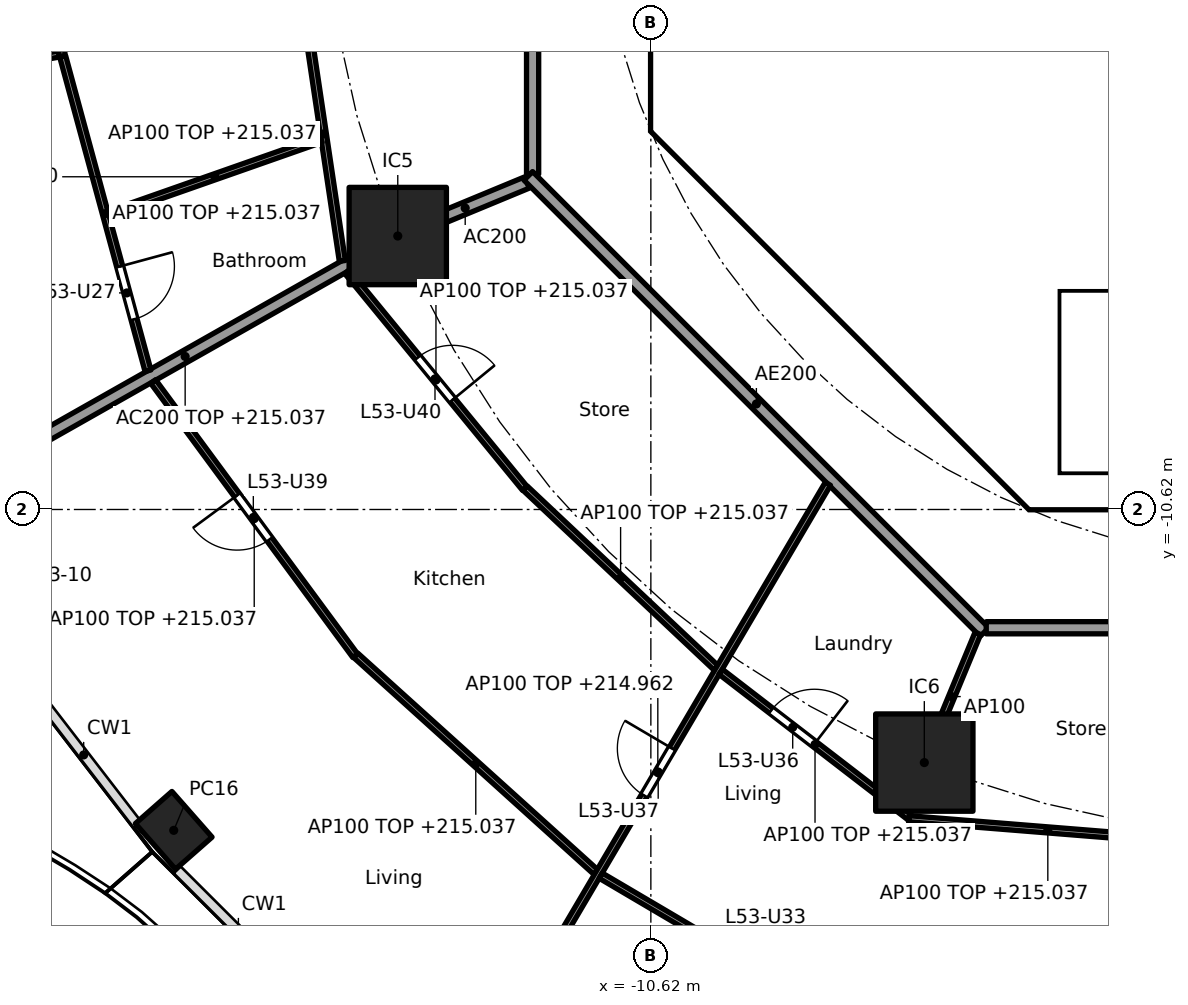
"""IFC4 building model, lengths in metres.
Left out: names, types, materials, properties, quantities, classifications, styles, units other than length and angle.
Written with IfcOpenShell. Run it as: python <this file> out.ifc"""

import sys

from ifc_helpers import new_model, si_unit, direction, frame, frame_2d, origin, origin_2d, place, context, subcontext, project, spatial, polyline, rectangle, hollow_rectangle, outline, extrude, element, fill, save


model = new_model("IFC4")
c1 = context("Model", 3, precision=1e-05, world=origin(), true_north=direction((0.0, 1.0)))
c2 = subcontext(c1, "Body", "Model", "MODEL_VIEW")
j1 = project(units=[si_unit("LENGTHUNIT", "METRE"), si_unit("PLANEANGLEUNIT", "RADIAN")], contexts=[c1])
p1 = place(None, origin())
s1 = spatial("IfcSite", under=j1, at=p1, CompositionType="ELEMENT")
p2 = place(p1, origin())
s2 = spatial("IfcBuilding", under=s1, at=p2, CompositionType="ELEMENT")
p3 = place(p2, frame((0.0, 0.0, 212.2)))
s3 = spatial("IfcBuildingStorey", under=s2, at=p3, CompositionType="ELEMENT", Elevation=212.2)
p4 = place(p3, frame((-18.467, -15.896, -0.26), z_axis=(0.0, 0.0, 1.0), x_axis=(0.660114607735, -0.751164898445, 0.0)))
e1 = element("IfcColumn", 1, at=p4, inside=s3, PredefinedType="COLUMN", context=c2, shape_type="SweptSolid", body=[
    extrude(hollow_rectangle(XDim=1.0, YDim=0.8, WallThickness=0.032, at=origin_2d()), origin(), (0.0, 0.0, 1.0), 3.96),
])
for number, where, z_axis, x_axis in (
    (2, (-14.782, -6.123, 0.0), (0.0, 0.0, 1.0), (1.0, 0.0, 0.0)),
    (3, (-6.123, -14.782, 0.0), (0.0, 0.0, 1.0), (1.0, 0.0, 0.0)),
):
    element("IfcColumn", number, at=place(p3, frame(where, z_axis=z_axis, x_axis=x_axis)), inside=s3, PredefinedType="COLUMN", context=c2, shape_type="SweptSolid", body=[
        extrude(rectangle(XDim=1.6, YDim=1.6, at=origin_2d()), origin(), (0.0, 0.0, 1.0), 3.7),
    ])
p5 = place(p3, frame((-10.325, 3.801, 0.0), z_axis=(0.0, 0.0, 1.0), x_axis=(0.0, -1.0, 0.0)))
e4 = element("IfcWall", 4, at=p5, inside=s3, PredefinedType="SHEAR", context=c2, shape_type="SweptSolid", body=[
    extrude(rectangle(XDim=7.602, YDim=0.6, at=frame_2d((3.801, 0.0))), origin(), (0.0, 0.0, 1.0), 3.44),
])
p6 = place(p5, frame((0.651, 0.0, 0.0)))
e5 = element("IfcOpeningElement", 5, at=p6, cuts=e4, PredefinedType="OPENING", context=c2, shape_type="SweptSolid", body=[
    extrude(rectangle(XDim=1.5, YDim=2.1, at=frame_2d((0.75, 1.05))), frame((0.0, 0.31, 0.0), z_axis=(0.0, -1.0, 0.0), x_axis=(1.0, 0.0, 0.0)), (0.0, 0.0, 1.0), 0.62),
])
p7 = place(p5, frame((5.451, 0.0, 0.0)))
e6 = element("IfcOpeningElement", 6, at=p7, cuts=e4, PredefinedType="OPENING", context=c2, shape_type="SweptSolid", body=[
    extrude(rectangle(XDim=1.5, YDim=2.1, at=frame_2d((0.75, 1.05))), frame((0.0, 0.31, 0.0), z_axis=(0.0, -1.0, 0.0), x_axis=(1.0, 0.0, 0.0)), (0.0, 0.0, 1.0), 0.62),
])
p8 = place(p3, frame((-9.988, -4.613, 0.0), z_axis=(0.0, 0.0, 1.0), x_axis=(0.707106781187, -0.707106781187, 0.0)))
e7 = element("IfcWall", 7, at=p8, inside=s3, PredefinedType="SHEAR", context=c2, shape_type="SweptSolid", body=[
    extrude(rectangle(XDim=7.602, YDim=0.6, at=frame_2d((3.801, 0.0))), origin(), (0.0, 0.0, 1.0), 3.44),
])
p9 = place(p8, frame((6.151, 0.0, 0.0)))
e8 = element("IfcOpeningElement", 8, at=p9, cuts=e7, PredefinedType="OPENING", context=c2, shape_type="SweptSolid", body=[
    extrude(rectangle(XDim=1.1, YDim=2.1, at=frame_2d((0.55, 1.05))), frame((0.0, 0.31, 0.0), z_axis=(0.0, -1.0, 0.0), x_axis=(1.0, 0.0, 0.0)), (0.0, 0.0, 1.0), 0.62),
])
p10 = place(p3, frame((-5.8, -8.227, 0.0), z_axis=(0.0, 0.0, 1.0), x_axis=(0.0, 1.0, 0.0)))
e9 = element("IfcWall", 9, at=p10, inside=s3, PredefinedType="PARTITIONING", context=c2, shape_type="SweptSolid", body=[
    extrude(rectangle(XDim=3.927, YDim=0.15, at=frame_2d((1.963, 0.0))), origin(), (0.0, 0.0, 1.0), 3.44),
])
p11 = place(p10, frame((2.615, 0.0, 0.0)))
e10 = element("IfcOpeningElement", 10, at=p11, cuts=e9, PredefinedType="OPENING", context=c2, shape_type="SweptSolid", body=[
    extrude(rectangle(XDim=0.9, YDim=2.1, at=frame_2d((0.45, 1.05))), frame((0.0, 0.085, 0.0), z_axis=(0.0, -1.0, 0.0), x_axis=(1.0, 0.0, 0.0)), (0.0, 0.0, 1.0), 0.17),
])
p12 = place(p10, frame((0.539, 0.0, 0.0)))
e11 = element("IfcOpeningElement", 11, at=p12, cuts=e9, PredefinedType="OPENING", context=c2, shape_type="SweptSolid", body=[
    extrude(rectangle(XDim=0.9, YDim=2.1, at=frame_2d((0.45, 1.05))), frame((0.0, 0.085, 0.0), z_axis=(0.0, -1.0, 0.0), x_axis=(1.0, 0.0, 0.0)), (0.0, 0.0, 1.0), 0.17),
])
p13 = place(p3, frame((-4.0, -6.5, 0.0), z_axis=(0.0, 0.0, 1.0), x_axis=(0.0, 1.0, 0.0)))
e12 = element("IfcWall", 12, at=p13, inside=s3, PredefinedType="SOLIDWALL", context=c2, shape_type="SweptSolid", body=[
    extrude(rectangle(XDim=2.2, YDim=0.2, at=frame_2d((1.1, 0.0))), origin(), (0.0, 0.0, 1.0), 3.44),
])
p14 = place(p13, frame((0.65, 0.0, 0.0)))
e13 = element("IfcOpeningElement", 13, at=p14, cuts=e12, PredefinedType="OPENING", context=c2, shape_type="SweptSolid", body=[
    extrude(rectangle(XDim=0.9, YDim=2.1, at=frame_2d((0.45, 1.05))), frame((0.0, 0.11, 0.0), z_axis=(0.0, -1.0, 0.0), x_axis=(1.0, 0.0, 0.0)), (0.0, 0.0, 1.0), 0.22),
])
p15 = place(p3, origin())
e14 = element("IfcWall", 14, at=p15, inside=s3, PredefinedType="SHEAR", context=c2, shape_type="SweptSolid", body=[
    extrude(outline(polyline([(-10.625, -3.801), (-10.025, -3.801), (-10.025, -4.152), (-9.776, -4.401), (-10.2, -4.825), (-10.625, -4.401), (-10.625, -3.801)])), origin(), (0.0, 0.0, 1.0), 3.44),
])
p16 = place(p3, origin())
e15 = element("IfcWall", 15, at=p16, inside=s3, PredefinedType="SHEAR", context=c2, shape_type="SweptSolid", body=[
    extrude(outline(polyline([(-4.152, -10.025), (4.152, -10.025), (4.401, -9.776), (4.825, -10.2), (4.401, -10.625), (-4.401, -10.625), (-4.825, -10.2), (-4.401, -9.776), (-4.152, -10.025)])), origin(), (0.0, 0.0, 1.0), 3.44),
])
p17 = place(p3, origin())
e16 = element("IfcWall", 16, at=p17, inside=s3, PredefinedType="SOLIDWALL", context=c2, shape_type="SweptSolid", body=[
    extrude(outline(polyline([(-6.7, -2.1), (-6.5, -2.1), (-6.5, -4.1), (-2.3, -4.1), (-2.3, -2.1), (-2.1, -2.1), (-2.1, -4.1), (-0.1, -4.1), (-0.1, -2.1), (0.1, -2.1), (0.1, -4.1), (2.1, -4.1), (2.1, -2.1), (2.3, -2.1), (2.3, -4.1), (4.3, -4.1), (4.3, -2.1), (4.5, -2.1), (4.5, -4.1), (6.5, -4.1), (6.5, -2.1), (6.7, -2.1), (6.7, -4.3), (-6.7, -4.3), (-6.7, -2.1)])), origin(), (0.0, 0.0, 1.0), 3.44),
])
p18 = place(p3, frame((-10.025, -4.0, 0.0), z_axis=(0.0, 0.0, 1.0), x_axis=(1.0, 0.0, 0.0)))
e17 = element("IfcWall", 17, at=p18, inside=s3, PredefinedType="PARTITIONING", context=c2, shape_type="SweptSolid", body=[
    extrude(rectangle(XDim=3.325, YDim=0.2, at=frame_2d((1.662, 0.0))), origin(), (0.0, 0.0, 1.0), 3.44),
])
p19 = place(p3, frame((-8.001, -6.1, 0.0), z_axis=(0.0, 0.0, 1.0), x_axis=(1.0, 0.0, 0.0)))
e18 = element("IfcWall", 18, at=p19, inside=s3, PredefinedType="PARTITIONING", context=c2, shape_type="SweptSolid", body=[
    extrude(rectangle(XDim=2.126, YDim=0.15, at=frame_2d((1.063, 0.0))), origin(), (0.0, 0.0, 1.0), 3.44),
])
p20 = place(p3, origin())
e19 = element("IfcWall", 19, at=p20, inside=s3, PredefinedType="SOLIDWALL", context=c2, shape_type="SweptSolid", body=[
    extrude(outline(polyline([(-3.9, -10.025), (-4.1, -10.025), (-4.1, -7.025), (-3.9, -7.025), (-3.9, -10.025)])), origin(), (0.0, 0.0, 1.0), 3.44),
])
p21 = place(p3, origin())
e20 = element("IfcWall", 20, at=p21, inside=s3, PredefinedType="SOLIDWALL", context=c2, shape_type="SweptSolid", body=[
    extrude(outline(polyline([(4.1, -7.025), (-4.1, -7.025), (-4.1, -6.5), (4.1, -6.5), (4.1, -7.025)])), origin(), (0.0, 0.0, 1.0), 3.44),
])
p22 = place(p3, frame((-12.657, -5.243, 0.0), z_axis=(0.0, 0.0, 1.0), x_axis=(-0.923859888513, -0.38273085373, 0.0)))
e21 = element("IfcWall", 21, at=p22, inside=s3, PredefinedType="PARTITIONING", context=c2, shape_type="SweptSolid", body=[
    extrude(rectangle(XDim=2.199, YDim=0.2, at=frame_2d((1.1, 0.0))), origin(), (0.0, 0.0, 1.0), 3.44),
])
p23 = place(p3, frame((-14.825, -6.148, 0.0), z_axis=(0.0, 0.0, 1.0), x_axis=(-0.870099576105, -0.492875975944, 0.0)))
e22 = element("IfcWall", 22, at=p23, inside=s3, PredefinedType="PARTITIONING", context=c2, shape_type="SweptSolid", body=[
    extrude(rectangle(XDim=7.937, YDim=0.2, at=frame_2d((3.969, 0.0))), origin(), (0.0, 0.0, 1.0), 2.837),
])
p24 = place(p3, frame((-12.565, 5.304, 0.0), z_axis=(0.0, 0.0, 1.0), x_axis=(0.0, -1.0, 0.0)))
e23 = element("IfcWall", 23, at=p24, inside=s3, PredefinedType="PARTITIONING", context=c2, shape_type="SweptSolid", body=[
    extrude(rectangle(XDim=10.409, YDim=0.2, at=frame_2d((5.205, 0.0))), origin(), (0.0, 0.0, 1.0), 3.44),
])
p25 = place(p24, frame((3.07, 0.0, 0.0)))
e24 = element("IfcOpeningElement", 24, at=p25, cuts=e23, PredefinedType="OPENING", context=c2, shape_type="SweptSolid", body=[
    extrude(rectangle(XDim=1.0, YDim=2.1, at=frame_2d((0.5, 1.05))), frame((0.0, 0.11, 0.0), z_axis=(0.0, -1.0, 0.0), x_axis=(1.0, 0.0, 0.0)), (0.0, 0.0, 1.0), 0.22),
])
p26 = place(p3, frame((-12.635, -5.134, 0.0), z_axis=(0.0, 0.0, 1.0), x_axis=(0.707106781187, -0.707106781187, 0.0)))
e25 = element("IfcWall", 25, at=p26, inside=s3, PredefinedType="PARTITIONING", context=c2, shape_type="SweptSolid", body=[
    extrude(rectangle(XDim=10.609, YDim=0.2, at=frame_2d((5.305, 0.0))), origin(), (0.0, 0.0, 1.0), 3.44),
])
p27 = place(p3, frame((-5.104, -12.565, 0.0), z_axis=(0.0, 0.0, 1.0), x_axis=(1.0, 0.0, 0.0)))
e26 = element("IfcWall", 26, at=p27, inside=s3, PredefinedType="PARTITIONING", context=c2, shape_type="SweptSolid", body=[
    extrude(rectangle(XDim=10.409, YDim=0.2, at=frame_2d((5.205, 0.0))), origin(), (0.0, 0.0, 1.0), 3.44),
])
p28 = place(p27, frame((4.604, 0.0, 0.0)))
e27 = element("IfcOpeningElement", 27, at=p28, cuts=e26, PredefinedType="OPENING", context=c2, shape_type="SweptSolid", body=[
    extrude(rectangle(XDim=1.0, YDim=2.1, at=frame_2d((0.5, 1.05))), frame((0.0, 0.11, 0.0), z_axis=(0.0, -1.0, 0.0), x_axis=(1.0, 0.0, 0.0)), (0.0, 0.0, 1.0), 0.22),
])
p29 = place(p3, frame((-20.81, 2.542, 0.0), z_axis=(0.0, 0.0, 1.0), x_axis=(0.088651453697, -0.996062708748, 0.0)))
e28 = element("IfcWall", 28, at=p29, inside=s3, PredefinedType="PARTITIONING", context=c2, shape_type="SweptSolid", body=[
    extrude(rectangle(XDim=5.737, YDim=0.1, at=frame_2d((2.868, 0.0))), origin(), (0.0, 0.0, 1.0), 2.837),
])
p30 = place(p3, frame((-16.318, -2.356, 0.0), z_axis=(0.0, 0.0, 1.0), x_axis=(0.147684413341, -0.989034536331, 0.0)))
e29 = element("IfcWall", 29, at=p30, inside=s3, PredefinedType="PARTITIONING", context=c2, shape_type="SweptSolid", body=[
    extrude(rectangle(XDim=4.222, YDim=0.1, at=frame_2d((2.111, 0.0))), origin(), (0.0, 0.0, 1.0), 2.837),
])
p31 = place(p3, frame((-20.355, -3.13, 0.0), z_axis=(0.0, 0.0, 1.0), x_axis=(-0.984331377639, -0.1763284974, 0.0)))
e30 = element("IfcWall", 30, at=p31, inside=s3, PredefinedType="PARTITIONING", context=c2, shape_type="SweptSolid", body=[
    extrude(rectangle(XDim=3.723, YDim=0.1, at=frame_2d((1.862, 0.0))), origin(), (0.0, 0.0, 1.0), 2.837),
])
p32 = place(p31, frame((1.412, 0.0, 0.0)))
e31 = element("IfcOpeningElement", 31, at=p32, cuts=e30, PredefinedType="OPENING", context=c2, shape_type="SweptSolid", body=[
    extrude(rectangle(XDim=0.9, YDim=2.1, at=frame_2d((0.45, 1.05))), frame((0.0, 0.06, 0.0), z_axis=(0.0, -1.0, 0.0), x_axis=(1.0, 0.0, 0.0)), (0.0, 0.0, 1.0), 0.12),
])
p33 = place(p3, frame((-20.292, -3.17, 0.0), z_axis=(0.0, 0.0, 1.0), x_axis=(0.26187906236, -0.965100697698, 0.0)))
e32 = element("IfcWall", 32, at=p33, inside=s3, PredefinedType="PARTITIONING", context=c2, shape_type="SweptSolid", body=[
    extrude(rectangle(XDim=5.356, YDim=0.1, at=frame_2d((2.678, 0.0))), origin(), (0.0, 0.0, 1.0), 2.837),
])
p34 = place(p33, frame((3.579, 0.0, 0.0)))
e33 = element("IfcOpeningElement", 33, at=p34, cuts=e32, PredefinedType="OPENING", context=c2, shape_type="SweptSolid", body=[
    extrude(rectangle(XDim=0.9, YDim=2.1, at=frame_2d((0.45, 1.05))), frame((0.0, 0.06, 0.0), z_axis=(0.0, -1.0, 0.0), x_axis=(1.0, 0.0, 0.0)), (0.0, 0.0, 1.0), 0.12),
])
p35 = place(p3, frame((-16.042, -4.535, 0.0), z_axis=(0.0, 0.0, 1.0), x_axis=(-0.94358986717, -0.331116539265, 0.0)))
e34 = element("IfcWall", 34, at=p35, inside=s3, PredefinedType="PARTITIONING", context=c2, shape_type="SweptSolid", body=[
    extrude(rectangle(XDim=3.704, YDim=0.1, at=frame_2d((1.852, 0.0))), origin(), (0.0, 0.0, 1.0), 3.44),
])
p36 = place(p3, frame((-15.616, -6.708, 0.0), z_axis=(0.0, 0.0, 1.0), x_axis=(0.634076422357, -0.773270386483, 0.0)))
e35 = element("IfcWall", 35, at=p36, inside=s3, PredefinedType="PARTITIONING", context=c2, shape_type="SweptSolid", body=[
    extrude(rectangle(XDim=4.611, YDim=0.1, at=frame_2d((2.306, 0.0))), origin(), (0.0, 0.0, 1.0), 2.837),
])
p37 = place(p36, frame((1.831, 0.0, 0.0)))
e36 = element("IfcOpeningElement", 36, at=p37, cuts=e35, PredefinedType="OPENING", context=c2, shape_type="SweptSolid", body=[
    extrude(rectangle(XDim=0.9, YDim=2.1, at=frame_2d((0.45, 1.05))), frame((0.0, 0.06, 0.0), z_axis=(0.0, -1.0, 0.0), x_axis=(1.0, 0.0, 0.0)), (0.0, 0.0, 1.0), 0.12),
])
p38 = place(p3, frame((-18.804, -8.516, 0.0), z_axis=(0.0, 0.0, 1.0), x_axis=(0.593249583583, -0.805018590828, 0.0)))
e37 = element("IfcWall", 37, at=p38, inside=s3, PredefinedType="PARTITIONING", context=c2, shape_type="SweptSolid", body=[
    extrude(rectangle(XDim=5.602, YDim=0.1, at=frame_2d((2.801, 0.0))), origin(), (0.0, 0.0, 1.0), 2.837),
])
p39 = place(p38, frame((2.326, 0.0, 0.0)))
e38 = element("IfcOpeningElement", 38, at=p39, cuts=e37, PredefinedType="OPENING", context=c2, shape_type="SweptSolid", body=[
    extrude(rectangle(XDim=0.9, YDim=2.1, at=frame_2d((0.45, 1.05))), frame((0.0, 0.06, 0.0), z_axis=(0.0, -1.0, 0.0), x_axis=(1.0, 0.0, 0.0)), (0.0, 0.0, 1.0), 0.12),
])
p40 = place(p3, frame((-12.688, -10.27, 0.0), z_axis=(0.0, 0.0, 1.0), x_axis=(0.728268142903, -0.685292282192, 0.0)))
e39 = element("IfcWall", 39, at=p40, inside=s3, PredefinedType="PARTITIONING", context=c2, shape_type="SweptSolid", body=[
    extrude(rectangle(XDim=4.312, YDim=0.1, at=frame_2d((2.156, 0.0))), origin(), (0.0, 0.0, 1.0), 2.837),
])
p41 = place(p3, frame((-15.474, -13.019, 0.0), z_axis=(0.0, 0.0, 1.0), x_axis=(0.742348572616, -0.670013878017, 0.0)))
e40 = element("IfcWall", 40, at=p41, inside=s3, PredefinedType="PARTITIONING", context=c2, shape_type="SweptSolid", body=[
    extrude(rectangle(XDim=5.319, YDim=0.1, at=frame_2d((2.66, 0.0))), origin(), (0.0, 0.0, 1.0), 2.837),
])
p42 = place(p3, frame((-7.709, -10.198, 0.0), z_axis=(0.0, 0.0, 1.0), x_axis=(-0.507355901053, -0.8617366127, 0.0)))
e41 = element("IfcWall", 41, at=p42, inside=s3, PredefinedType="PARTITIONING", context=c2, shape_type="SweptSolid", body=[
    extrude(rectangle(XDim=11.025, YDim=0.1, at=frame_2d((5.512, 0.0))), origin(), (0.0, 0.0, 1.0), 2.762),
])
p43 = place(p42, frame((5.05, 0.0, 0.0)))
e42 = element("IfcOpeningElement", 42, at=p43, cuts=e41, PredefinedType="OPENING", context=c2, shape_type="SweptSolid", body=[
    extrude(rectangle(XDim=0.9, YDim=2.1, at=frame_2d((0.45, 1.05))), frame((0.0, 0.06, 0.0), z_axis=(0.0, -1.0, 0.0), x_axis=(1.0, 0.0, 0.0)), (0.0, 0.0, 1.0), 0.12),
])
p44 = place(p3, frame((-9.471, -13.289, 0.0), z_axis=(0.0, 0.0, 1.0), x_axis=(0.7922205419, -0.61023488346, 0.0)))
e43 = element("IfcWall", 43, at=p44, inside=s3, PredefinedType="PARTITIONING", context=c2, shape_type="SweptSolid", body=[
    extrude(rectangle(XDim=3.916, YDim=0.1, at=frame_2d((1.958, 0.0))), origin(), (0.0, 0.0, 1.0), 2.837),
])
p45 = place(p44, frame((1.045, 0.0, 0.0)))
e44 = element("IfcOpeningElement", 44, at=p45, cuts=e43, PredefinedType="OPENING", context=c2, shape_type="SweptSolid", body=[
    extrude(rectangle(XDim=0.9, YDim=2.1, at=frame_2d((0.45, 1.05))), frame((0.0, 0.06, 0.0), z_axis=(0.0, -1.0, 0.0), x_axis=(1.0, 0.0, 0.0)), (0.0, 0.0, 1.0), 0.12),
])
p46 = place(p3, frame((-11.445, -16.641, 0.0), z_axis=(0.0, 0.0, 1.0), x_axis=(0.861562560957, -0.507651409489, 0.0)))
e45 = element("IfcWall", 45, at=p46, inside=s3, PredefinedType="PARTITIONING", context=c2, shape_type="SweptSolid", body=[
    extrude(rectangle(XDim=4.985, YDim=0.1, at=frame_2d((2.492, 0.0))), origin(), (0.0, 0.0, 1.0), 2.837),
])
p47 = place(p46, frame((2.042, 0.0, 0.0)))
e46 = element("IfcOpeningElement", 46, at=p47, cuts=e45, PredefinedType="OPENING", context=c2, shape_type="SweptSolid", body=[
    extrude(rectangle(XDim=0.9, YDim=2.1, at=frame_2d((0.45, 1.05))), frame((0.0, 0.06, 0.0), z_axis=(0.0, -1.0, 0.0), x_axis=(1.0, 0.0, 0.0)), (0.0, 0.0, 1.0), 0.12),
])
p48 = place(p3, frame((-5.243, -12.657, 0.0), z_axis=(0.0, 0.0, 1.0), x_axis=(-0.382719158442, -0.923864733477, 0.0)))
e47 = element("IfcWall", 47, at=p48, inside=s3, PredefinedType="PARTITIONING", context=c2, shape_type="SweptSolid", body=[
    extrude(rectangle(XDim=2.25, YDim=0.1, at=frame_2d((1.125, 0.0))), origin(), (0.0, 0.0, 1.0), 3.44),
])
p49 = place(p3, frame((-6.379, -15.705, 0.0), z_axis=(0.0, 0.0, 1.0), x_axis=(0.996786462227, -0.080104611105, 0.0)))
e48 = element("IfcWall", 48, at=p49, inside=s3, PredefinedType="PARTITIONING", context=c2, shape_type="SweptSolid", body=[
    extrude(rectangle(XDim=4.59, YDim=0.1, at=frame_2d((2.295, 0.0))), origin(), (0.0, 0.0, 1.0), 2.837),
])
p50 = place(p11, origin())
e49 = element("IfcDoor", 49, at=p50, inside=s3, OperationType="SINGLE_SWING_LEFT", PredefinedType="DOOR", context=c2, shape_type="SweptSolid", body=[
    extrude(rectangle(XDim=0.9, YDim=2.1, at=frame_2d((0.45, 1.05))), frame((0.0, 0.025, 0.0), z_axis=(0.0, -1.0, 0.0), x_axis=(1.0, 0.0, 0.0)), (0.0, 0.0, 1.0), 0.05),
])
fill(e10, e49)
p51 = place(p12, origin())
e50 = element("IfcDoor", 50, at=p51, inside=s3, OperationType="SINGLE_SWING_LEFT", PredefinedType="DOOR", context=c2, shape_type="SweptSolid", body=[
    extrude(rectangle(XDim=0.9, YDim=2.1, at=frame_2d((0.45, 1.05))), frame((0.0, 0.025, 0.0), z_axis=(0.0, -1.0, 0.0), x_axis=(1.0, 0.0, 0.0)), (0.0, 0.0, 1.0), 0.05),
])
fill(e11, e50)
p52 = place(p14, frame((0.9, 0.0, 0.0), x_axis=(-1.0, 0.0, 0.0)))
e51 = element("IfcDoor", 51, at=p52, inside=s3, OperationType="SINGLE_SWING_RIGHT", PredefinedType="DOOR", context=c2, shape_type="SweptSolid", body=[
    extrude(rectangle(XDim=0.9, YDim=2.1, at=frame_2d((0.45, 1.05))), frame((0.0, 0.025, 0.0), z_axis=(0.0, -1.0, 0.0), x_axis=(1.0, 0.0, 0.0)), (0.0, 0.0, 1.0), 0.05),
])
fill(e13, e51)
p53 = place(p7, origin())
e52 = element("IfcDoor", 52, at=p53, inside=s3, OperationType="DOUBLE_DOOR_SINGLE_SWING", PredefinedType="DOOR", context=c2, shape_type="SweptSolid", body=[
    extrude(rectangle(XDim=1.5, YDim=2.1, at=frame_2d((0.75, 1.05))), frame((0.0, 0.025, 0.0), z_axis=(0.0, -1.0, 0.0), x_axis=(1.0, 0.0, 0.0)), (0.0, 0.0, 1.0), 0.05),
])
fill(e6, e52)
p54 = place(p9, origin())
e53 = element("IfcDoor", 53, at=p54, inside=s3, OperationType="SINGLE_SWING_LEFT", PredefinedType="DOOR", context=c2, shape_type="SweptSolid", body=[
    extrude(rectangle(XDim=1.1, YDim=2.1, at=frame_2d((0.55, 1.05))), frame((0.0, 0.025, 0.0), z_axis=(0.0, -1.0, 0.0), x_axis=(1.0, 0.0, 0.0)), (0.0, 0.0, 1.0), 0.05),
])
fill(e8, e53)
p55 = place(p34, origin())
e54 = element("IfcDoor", 54, at=p55, inside=s3, OperationType="SINGLE_SWING_LEFT", PredefinedType="DOOR", context=c2, shape_type="SweptSolid", body=[
    extrude(rectangle(XDim=0.9, YDim=2.1, at=frame_2d((0.45, 1.05))), frame((0.0, 0.025, 0.0), z_axis=(0.0, -1.0, 0.0), x_axis=(1.0, 0.0, 0.0)), (0.0, 0.0, 1.0), 0.05),
])
fill(e33, e54)
p56 = place(p45, origin())
e55 = element("IfcDoor", 55, at=p56, inside=s3, OperationType="SINGLE_SWING_RIGHT", PredefinedType="DOOR", context=c2, shape_type="SweptSolid", body=[
    extrude(rectangle(XDim=0.9, YDim=2.1, at=frame_2d((0.45, 1.05))), frame((0.0, 0.025, 0.0), z_axis=(0.0, -1.0, 0.0), x_axis=(1.0, 0.0, 0.0)), (0.0, 0.0, 1.0), 0.05),
])
fill(e44, e55)
p57 = place(p43, frame((0.9, 0.0, 0.0), x_axis=(-1.0, 0.0, 0.0)))
e56 = element("IfcDoor", 56, at=p57, inside=s3, OperationType="SINGLE_SWING_RIGHT", PredefinedType="DOOR", context=c2, shape_type="SweptSolid", body=[
    extrude(rectangle(XDim=0.9, YDim=2.1, at=frame_2d((0.45, 1.05))), frame((0.0, 0.025, 0.0), z_axis=(0.0, -1.0, 0.0), x_axis=(1.0, 0.0, 0.0)), (0.0, 0.0, 1.0), 0.05),
])
fill(e42, e56)
p58 = place(p39, frame((0.9, 0.0, 0.0), x_axis=(-1.0, 0.0, 0.0)))
e57 = element("IfcDoor", 57, at=p58, inside=s3, OperationType="SINGLE_SWING_RIGHT", PredefinedType="DOOR", context=c2, shape_type="SweptSolid", body=[
    extrude(rectangle(XDim=0.9, YDim=2.1, at=frame_2d((0.45, 1.05))), frame((0.0, 0.025, 0.0), z_axis=(0.0, -1.0, 0.0), x_axis=(1.0, 0.0, 0.0)), (0.0, 0.0, 1.0), 0.05),
])
fill(e38, e57)
p59 = place(p37, origin())
e58 = element("IfcDoor", 58, at=p59, inside=s3, OperationType="SINGLE_SWING_RIGHT", PredefinedType="DOOR", context=c2, shape_type="SweptSolid", body=[
    extrude(rectangle(XDim=0.9, YDim=2.1, at=frame_2d((0.45, 1.05))), frame((0.0, 0.025, 0.0), z_axis=(0.0, -1.0, 0.0), x_axis=(1.0, 0.0, 0.0)), (0.0, 0.0, 1.0), 0.05),
])
fill(e36, e58)
save(model, sys.argv[1])
